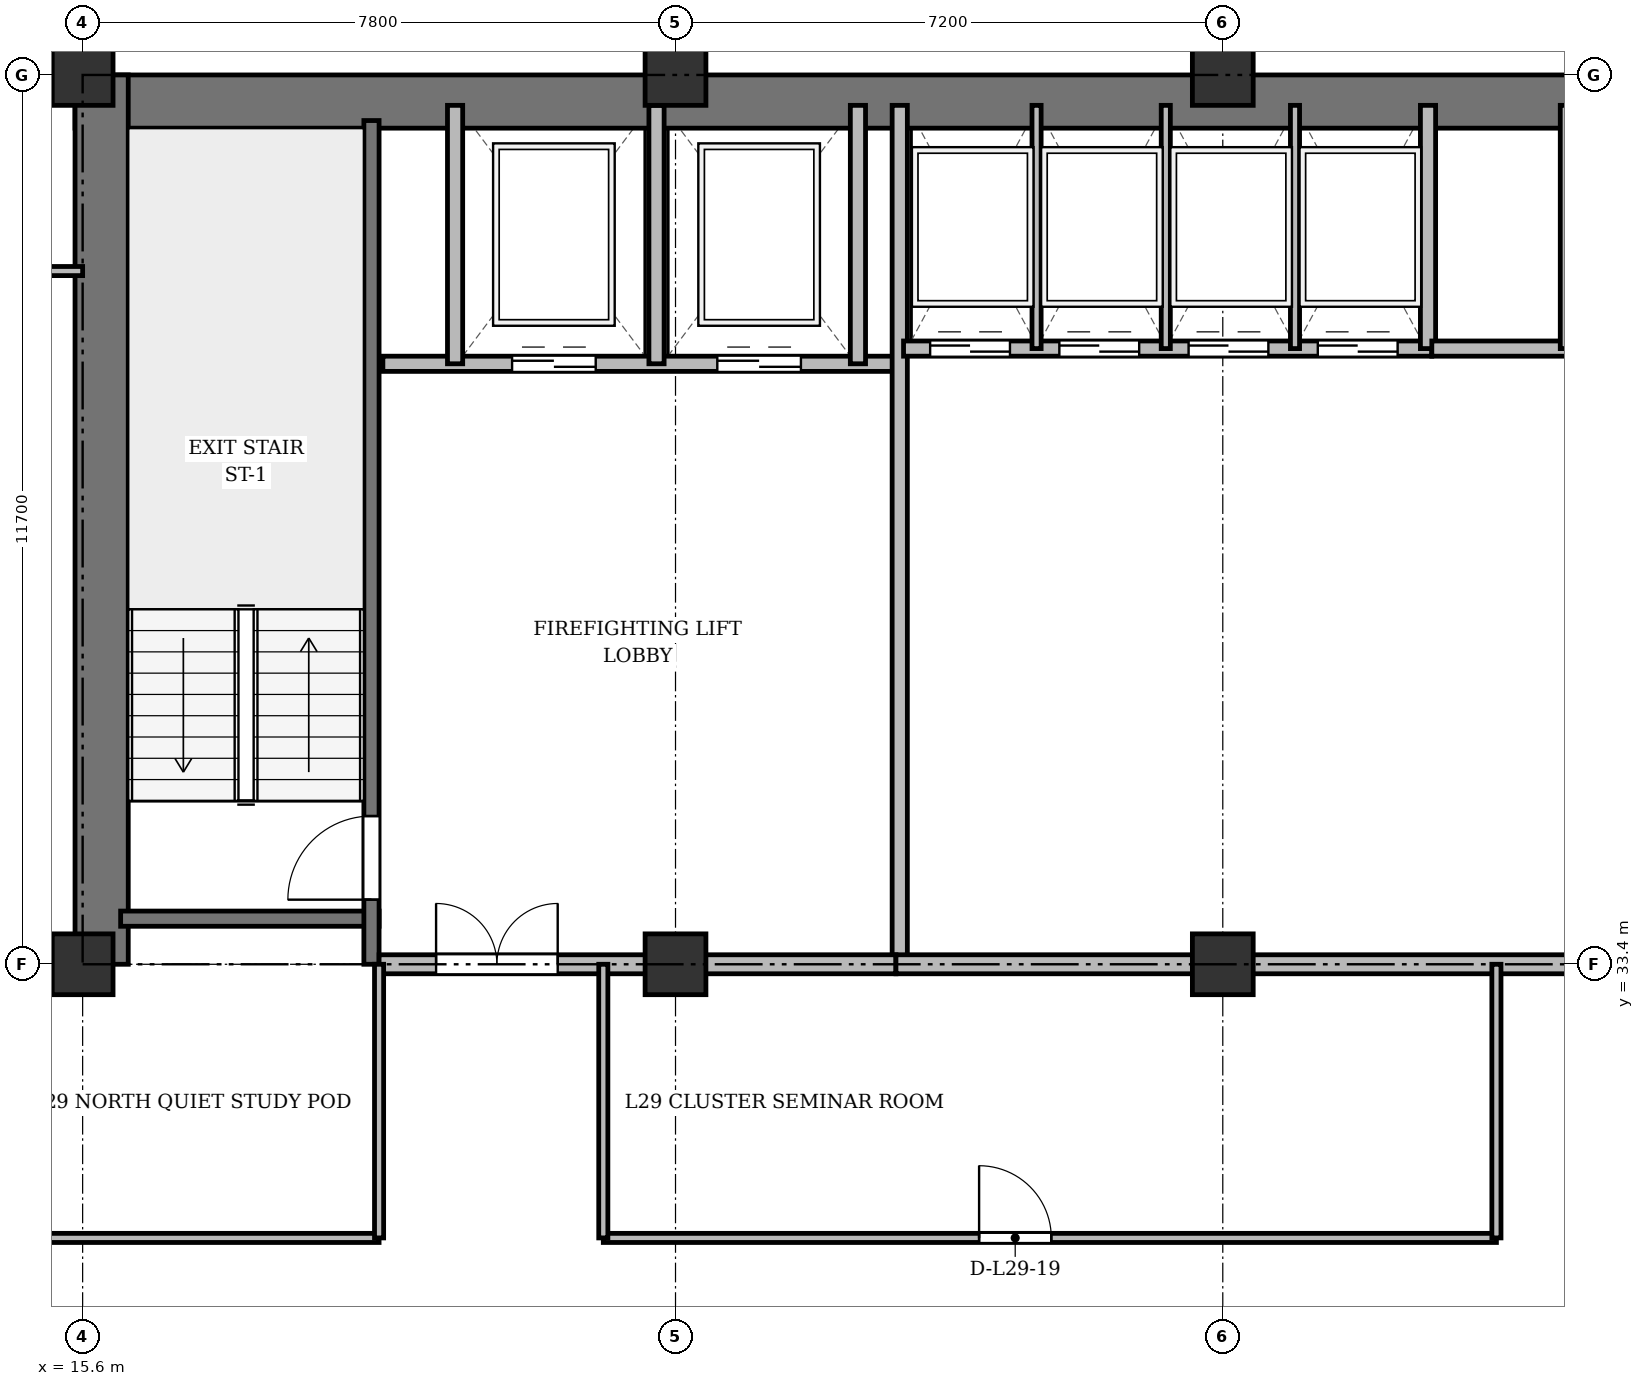
"""IFC4 building model, lengths in metres.
Left out: names, types, materials, properties, quantities, classifications, styles, units other than length and angle.
Written with IfcOpenShell. Run it as: python <this file> out.ifc"""

import sys

from ifc_helpers import new_model, si_unit, direction, frame, frame_2d, origin, origin_2d, place, context, subcontext, project, spatial, rectangle, extrude, source, transform, mapped, element, fill, save


model = new_model("IFC4")
c1 = context("Model", 3, precision=1e-05, world=origin(), true_north=direction((0.0, 1.0)))
c2 = subcontext(c1, "Body", "Model", "MODEL_VIEW")
j1 = project(units=[si_unit("LENGTHUNIT", "METRE"), si_unit("PLANEANGLEUNIT", "RADIAN")], contexts=[c1])
p1 = place(None, origin())
s1 = spatial("IfcSite", under=j1, at=p1, CompositionType="ELEMENT")
p2 = place(p1, origin())
s2 = spatial("IfcBuilding", under=s1, at=p2, CompositionType="ELEMENT")
p3 = place(p2, frame((0.0, 0.0, 114.1)))
s3 = spatial("IfcBuildingStorey", under=s2, at=p3, CompositionType="ELEMENT", Elevation=114.1)
m1 = source(origin(), c2, "Body", "SweptSolid", [
    extrude(rectangle(XDim=0.8, YDim=0.8, at=origin_2d()), origin(), (0.0, 0.0, 1.0), 3.6),
])
for number, where, z_axis, x_axis in (
    (1, (15.6, 33.4, 0.0), (0.0, 0.0, 1.0), (1.0, 0.0, 0.0)),
    (2, (15.6, 45.1, 0.0), (0.0, 0.0, 1.0), (1.0, 0.0, 0.0)),
    (3, (23.4, 33.4, 0.0), (0.0, 0.0, 1.0), (1.0, 0.0, 0.0)),
    (4, (23.4, 45.1, 0.0), (0.0, 0.0, 1.0), (1.0, 0.0, 0.0)),
    (5, (30.6, 33.4, 0.0), (0.0, 0.0, 1.0), (1.0, 0.0, 0.0)),
    (6, (30.6, 45.1, 0.0), (0.0, 0.0, 1.0), (1.0, 0.0, 0.0)),
):
    element("IfcColumn", number, at=place(p3, frame(where, z_axis=z_axis, x_axis=x_axis)), inside=s3, PredefinedType="COLUMN", context=c2, shape_type="MappedRepresentation", body=[
        mapped(m1, transform((0.0, 0.0, 0.0), x_axis=(1.0, 0.0, 0.0), y_axis=(0.0, 1.0, 0.0), z_axis=(0.0, 0.0, 1.0), scale=1.0)),
    ])
p4 = place(p3, frame((15.5, 44.75, 0.0), z_axis=(0.0, 0.0, 1.0), x_axis=(1.0, 0.0, 0.0)))
e7 = element("IfcWall", 7, at=p4, inside=s3, PredefinedType="SHEAR", context=c2, shape_type="SweptSolid", body=[
    extrude(rectangle(XDim=43.4, YDim=0.7, at=frame_2d((21.7, 0.0))), origin(), (0.0, 0.0, 1.0), 3.34),
])
p5 = place(p3, frame((15.85, 33.4, 0.0), z_axis=(0.0, 0.0, 1.0), x_axis=(0.0, 1.0, 0.0)))
e8 = element("IfcWall", 8, at=p5, inside=s3, PredefinedType="SHEAR", context=c2, shape_type="SweptSolid", body=[
    extrude(rectangle(XDim=11.7, YDim=0.7, at=frame_2d((5.85, 0.0))), origin(), (0.0, 0.0, 1.0), 3.34),
])
p6 = place(p3, frame((16.1, 34.0, 0.0), z_axis=(0.0, 0.0, 1.0), x_axis=(1.0, 0.0, 0.0)))
e9 = element("IfcWall", 9, at=p6, inside=s3, PredefinedType="SHEAR", context=c2, shape_type="SweptSolid", body=[
    extrude(rectangle(XDim=3.4, YDim=0.2, at=frame_2d((1.7, 0.0))), origin(), (0.0, 0.0, 1.0), 3.34),
])
p7 = place(p3, frame((19.4, 33.4, 0.0), z_axis=(0.0, 0.0, 1.0), x_axis=(0.0, 1.0, 0.0)))
e10 = element("IfcWall", 10, at=p7, inside=s3, PredefinedType="SHEAR", context=c2, shape_type="SweptSolid", body=[
    extrude(rectangle(XDim=11.1, YDim=0.2, at=frame_2d((5.55, 0.0))), origin(), (0.0, 0.0, 1.0), 3.34),
])
p8 = place(p7, frame((0.85, 0.0, 0.0)))
e11 = element("IfcOpeningElement", 11, at=p8, cuts=e10, PredefinedType="OPENING", context=c2, shape_type="SweptSolid", body=[
    extrude(rectangle(XDim=1.1, YDim=2.15, at=frame_2d((0.55, 1.075))), frame((0.0, 0.11, 0.0), z_axis=(0.0, -1.0, 0.0), x_axis=(1.0, 0.0, 0.0)), (0.0, 0.0, 1.0), 0.22),
])
p9 = place(p3, frame((19.55, 41.3, 0.0), z_axis=(0.0, 0.0, 1.0), x_axis=(1.0, 0.0, 0.0)))
e12 = element("IfcWall", 12, at=p9, inside=s3, PredefinedType="SOLIDWALL", context=c2, shape_type="SweptSolid", body=[
    extrude(rectangle(XDim=6.75, YDim=0.2, at=frame_2d((3.375, 0.0))), origin(), (0.0, 0.0, 1.0), 3.34),
])
p10 = place(p9, frame((1.7, 0.0, 0.0)))
e13 = element("IfcOpeningElement", 13, at=p10, cuts=e12, PredefinedType="OPENING", context=c2, shape_type="SweptSolid", body=[
    extrude(rectangle(XDim=1.1, YDim=2.15, at=frame_2d((0.55, 1.075))), frame((0.0, 0.11, 0.0), z_axis=(0.0, -1.0, 0.0), x_axis=(1.0, 0.0, 0.0)), (0.0, 0.0, 1.0), 0.22),
])
p11 = place(p9, frame((4.4, 0.0, 0.0)))
e14 = element("IfcOpeningElement", 14, at=p11, cuts=e12, PredefinedType="OPENING", context=c2, shape_type="SweptSolid", body=[
    extrude(rectangle(XDim=1.1, YDim=2.15, at=frame_2d((0.55, 1.075))), frame((0.0, 0.11, 0.0), z_axis=(0.0, -1.0, 0.0), x_axis=(1.0, 0.0, 0.0)), (0.0, 0.0, 1.0), 0.22),
])
for number, where, z_axis, x_axis in (
    (15, (20.5, 41.3, 0.0), (0.0, 0.0, 1.0), (0.0, 1.0, 0.0)),
    (16, (23.15, 41.3, 0.0), (0.0, 0.0, 1.0), (0.0, 1.0, 0.0)),
    (17, (25.8, 41.3, 0.0), (0.0, 0.0, 1.0), (0.0, 1.0, 0.0)),
):
    element("IfcWall", number, at=place(p3, frame(where, z_axis=z_axis, x_axis=x_axis)), inside=s3, PredefinedType="SOLIDWALL", context=c2, shape_type="SweptSolid", body=[
        extrude(rectangle(XDim=3.4, YDim=0.2, at=frame_2d((1.7, 0.0))), origin(), (0.0, 0.0, 1.0), 3.34),
    ])
p12 = place(p3, frame((26.35, 33.4, 0.0), z_axis=(0.0, 0.0, 1.0), x_axis=(0.0, 1.0, 0.0)))
e18 = element("IfcWall", 18, at=p12, inside=s3, PredefinedType="SOLIDWALL", context=c2, shape_type="SweptSolid", body=[
    extrude(rectangle(XDim=11.3, YDim=0.2, at=frame_2d((5.65, 0.0))), origin(), (0.0, 0.0, 1.0), 2.752),
])
p13 = place(p3, frame((19.5, 33.4, 0.0), z_axis=(0.0, 0.0, 1.0), x_axis=(1.0, 0.0, 0.0)))
e19 = element("IfcWall", 19, at=p13, inside=s3, PredefinedType="PARTITIONING", context=c2, shape_type="SweptSolid", body=[
    extrude(rectangle(XDim=6.8, YDim=0.25, at=frame_2d((3.4, 0.0))), origin(), (0.0, 0.0, 1.0), 2.752),
])
p14 = place(p13, frame((0.75, 0.0, 0.0)))
e20 = element("IfcOpeningElement", 20, at=p14, cuts=e19, PredefinedType="OPENING", context=c2, shape_type="SweptSolid", body=[
    extrude(rectangle(XDim=1.6, YDim=2.2, at=frame_2d((0.8, 1.1))), frame((0.0, 0.135, 0.0), z_axis=(0.0, -1.0, 0.0), x_axis=(1.0, 0.0, 0.0)), (0.0, 0.0, 1.0), 0.27),
])
p15 = place(p3, frame((26.4, 41.5, 0.0), z_axis=(0.0, 0.0, 1.0), x_axis=(1.0, 0.0, 0.0)))
e21 = element("IfcWall", 21, at=p15, inside=s3, PredefinedType="SOLIDWALL", context=c2, shape_type="SweptSolid", body=[
    extrude(rectangle(XDim=6.95, YDim=0.2, at=frame_2d((3.475, 0.0))), origin(), (0.0, 0.0, 1.0), 3.34),
])
p16 = place(p15, frame((0.35, 0.0, 0.0)))
e22 = element("IfcOpeningElement", 22, at=p16, cuts=e21, PredefinedType="OPENING", context=c2, shape_type="SweptSolid", body=[
    extrude(rectangle(XDim=1.05, YDim=2.15, at=frame_2d((0.525, 1.075))), frame((0.0, 0.11, 0.0), z_axis=(0.0, -1.0, 0.0), x_axis=(1.0, 0.0, 0.0)), (0.0, 0.0, 1.0), 0.22),
])
p17 = place(p15, frame((2.05, 0.0, 0.0)))
e23 = element("IfcOpeningElement", 23, at=p17, cuts=e21, PredefinedType="OPENING", context=c2, shape_type="SweptSolid", body=[
    extrude(rectangle(XDim=1.05, YDim=2.15, at=frame_2d((0.525, 1.075))), frame((0.0, 0.11, 0.0), z_axis=(0.0, -1.0, 0.0), x_axis=(1.0, 0.0, 0.0)), (0.0, 0.0, 1.0), 0.22),
])
p18 = place(p15, frame((3.75, 0.0, 0.0)))
e24 = element("IfcOpeningElement", 24, at=p18, cuts=e21, PredefinedType="OPENING", context=c2, shape_type="SweptSolid", body=[
    extrude(rectangle(XDim=1.05, YDim=2.15, at=frame_2d((0.525, 1.075))), frame((0.0, 0.11, 0.0), z_axis=(0.0, -1.0, 0.0), x_axis=(1.0, 0.0, 0.0)), (0.0, 0.0, 1.0), 0.22),
])
p19 = place(p15, frame((5.45, 0.0, 0.0)))
e25 = element("IfcOpeningElement", 25, at=p19, cuts=e21, PredefinedType="OPENING", context=c2, shape_type="SweptSolid", body=[
    extrude(rectangle(XDim=1.05, YDim=2.15, at=frame_2d((0.525, 1.075))), frame((0.0, 0.11, 0.0), z_axis=(0.0, -1.0, 0.0), x_axis=(1.0, 0.0, 0.0)), (0.0, 0.0, 1.0), 0.22),
])
p20 = place(p3, frame((33.3, 41.5, 0.0), z_axis=(0.0, 0.0, 1.0), x_axis=(0.0, 1.0, 0.0)))
e26 = element("IfcWall", 26, at=p20, inside=s3, PredefinedType="SOLIDWALL", context=c2, shape_type="SweptSolid", body=[
    extrude(rectangle(XDim=3.2, YDim=0.2, at=frame_2d((1.6, 0.0))), origin(), (0.0, 0.0, 1.0), 3.34),
])
for number, where, z_axis, x_axis in (
    (27, (28.15, 41.5, 0.0), (0.0, 0.0, 1.0), (0.0, 1.0, 0.0)),
    (28, (29.85, 41.5, 0.0), (0.0, 0.0, 1.0), (0.0, 1.0, 0.0)),
    (29, (31.55, 41.5, 0.0), (0.0, 0.0, 1.0), (0.0, 1.0, 0.0)),
):
    element("IfcWall", number, at=place(p3, frame(where, z_axis=z_axis, x_axis=x_axis)), inside=s3, PredefinedType="PARTITIONING", context=c2, shape_type="SweptSolid", body=[
        extrude(rectangle(XDim=3.2, YDim=0.12, at=frame_2d((1.6, 0.0))), origin(), (0.0, 0.0, 1.0), 3.34),
    ])
p21 = place(p3, frame((33.35, 41.5, 0.0), z_axis=(0.0, 0.0, 1.0), x_axis=(1.0, 0.0, 0.0)))
e30 = element("IfcWall", 30, at=p21, inside=s3, PredefinedType="SOLIDWALL", context=c2, shape_type="SweptSolid", body=[
    extrude(rectangle(XDim=6.9, YDim=0.2, at=frame_2d((3.45, 0.0))), origin(), (0.0, 0.0, 1.0), 3.34),
])
p22 = place(p3, frame((35.1, 41.5, 0.0), z_axis=(0.0, 0.0, 1.0), x_axis=(0.0, 1.0, 0.0)))
e31 = element("IfcWall", 31, at=p22, inside=s3, PredefinedType="PARTITIONING", context=c2, shape_type="SweptSolid", body=[
    extrude(rectangle(XDim=3.2, YDim=0.12, at=frame_2d((1.6, 0.0))), origin(), (0.0, 0.0, 1.0), 3.34),
])
p23 = place(p3, frame((26.3, 33.4, 0.0), z_axis=(0.0, 0.0, 1.0), x_axis=(1.0, 0.0, 0.0)))
e32 = element("IfcWall", 32, at=p23, inside=s3, PredefinedType="PARTITIONING", context=c2, shape_type="SweptSolid", body=[
    extrude(rectangle(XDim=20.85, YDim=0.25, at=frame_2d((10.425, 0.0))), origin(), (0.0, 0.0, 1.0), 2.752),
])
p24 = place(p23, frame((9.2, 0.0, 0.0)))
e33 = element("IfcOpeningElement", 33, at=p24, cuts=e32, PredefinedType="OPENING", context=c2, shape_type="SweptSolid", body=[
    extrude(rectangle(XDim=1.6, YDim=2.2, at=frame_2d((0.8, 1.1))), frame((0.0, 0.135, 0.0), z_axis=(0.0, -1.0, 0.0), x_axis=(1.0, 0.0, 0.0)), (0.0, 0.0, 1.0), 0.27),
])
p25 = place(p3, frame((4.75, 29.8, 0.0), z_axis=(0.0, 0.0, 1.0), x_axis=(1.0, 0.0, 0.0)))
e34 = element("IfcWall", 34, at=p25, inside=s3, PredefinedType="PARTITIONING", context=c2, shape_type="SweptSolid", body=[
    extrude(rectangle(XDim=14.75, YDim=0.12, at=frame_2d((7.375, 0.0))), origin(), (0.0, 0.0, 1.0), 2.84),
])
p26 = place(p25, frame((6.9, 0.0, 0.0)))
e35 = element("IfcOpeningElement", 35, at=p26, cuts=e34, PredefinedType="OPENING", context=c2, shape_type="SweptSolid", body=[
    extrude(rectangle(XDim=0.95, YDim=2.15, at=frame_2d((0.475, 1.075))), frame((0.0, 0.07, 0.0), z_axis=(0.0, -1.0, 0.0), x_axis=(1.0, 0.0, 0.0)), (0.0, 0.0, 1.0), 0.14),
])
p27 = place(p3, frame((22.45, 29.8, 0.0), z_axis=(0.0, 0.0, 1.0), x_axis=(1.0, 0.0, 0.0)))
e36 = element("IfcWall", 36, at=p27, inside=s3, PredefinedType="PARTITIONING", context=c2, shape_type="SweptSolid", body=[
    extrude(rectangle(XDim=11.75, YDim=0.12, at=frame_2d((5.875, 0.0))), origin(), (0.0, 0.0, 1.0), 2.84),
])
p28 = place(p27, frame((4.944, 0.0, 0.0)))
e37 = element("IfcOpeningElement", 37, at=p28, cuts=e36, PredefinedType="OPENING", context=c2, shape_type="SweptSolid", body=[
    extrude(rectangle(XDim=0.95, YDim=2.15, at=frame_2d((0.475, 1.075))), frame((0.0, 0.07, 0.0), z_axis=(0.0, -1.0, 0.0), x_axis=(1.0, 0.0, 0.0)), (0.0, 0.0, 1.0), 0.14),
])
for number, where, z_axis, x_axis in (
    (38, (19.5, 29.8, 0.0), (0.0, 0.0, 1.0), (0.0, 1.0, 0.0)),
    (39, (22.45, 29.8, 0.0), (0.0, 0.0, 1.0), (0.0, 1.0, 0.0)),
    (40, (34.2, 29.8, 0.0), (0.0, 0.0, 1.0), (0.0, 1.0, 0.0)),
):
    element("IfcWall", number, at=place(p3, frame(where, z_axis=z_axis, x_axis=x_axis)), inside=s3, PredefinedType="PARTITIONING", context=c2, shape_type="SweptSolid", body=[
        extrude(rectangle(XDim=3.6, YDim=0.12, at=frame_2d((1.8, 0.0))), origin(), (0.0, 0.0, 1.0), 2.752),
    ])
p29 = place(p3, frame((10.175, 42.52, 0.0), z_axis=(0.0, 0.0, 1.0), x_axis=(1.0, 0.0, 0.0)))
e41 = element("IfcWall", 41, at=p29, inside=s3, PredefinedType="PARTITIONING", context=c2, shape_type="SweptSolid", body=[
    extrude(rectangle(XDim=5.425, YDim=0.12, at=frame_2d((2.712, 0.0))), origin(), (0.0, 0.0, 1.0), 2.84),
])
p30 = place(p29, frame((2.052, 0.0, 0.0)))
e42 = element("IfcOpeningElement", 42, at=p30, cuts=e41, PredefinedType="OPENING", context=c2, shape_type="SweptSolid", body=[
    extrude(rectangle(XDim=0.95, YDim=2.15, at=frame_2d((0.475, 1.075))), frame((0.0, 0.07, 0.0), z_axis=(0.0, -1.0, 0.0), x_axis=(1.0, 0.0, 0.0)), (0.0, 0.0, 1.0), 0.14),
])
p31 = place(p3, frame((4.75, 33.4, 0.0), z_axis=(0.0, 0.0, 1.0), x_axis=(1.0, 0.0, 0.0)))
e43 = element("IfcWall", 43, at=p31, inside=s3, PredefinedType="PARTITIONING", context=c2, shape_type="SweptSolid", body=[
    extrude(rectangle(XDim=10.85, YDim=0.15, at=frame_2d((5.425, 0.0))), origin(), (0.0, 0.0, 1.0), 2.752),
])
p32 = place(p31, frame((6.025, 0.0, 0.0)))
e44 = element("IfcOpeningElement", 44, at=p32, cuts=e43, PredefinedType="OPENING", context=c2, shape_type="SweptSolid", body=[
    extrude(rectangle(XDim=0.95, YDim=2.15, at=frame_2d((0.475, 1.075))), frame((0.0, 0.085, 0.0), z_axis=(0.0, -1.0, 0.0), x_axis=(1.0, 0.0, 0.0)), (0.0, 0.0, 1.0), 0.17),
])
p33 = place(p3, frame((15.6, 44.75, 0.0), z_axis=(0.0, 0.0, 1.0), x_axis=(0.0, 1.0, 0.0)))
e45 = element("IfcWall", 45, at=p33, inside=s3, PredefinedType="PARTITIONING", context=c2, shape_type="SweptSolid", body=[
    extrude(rectangle(XDim=3.61, YDim=0.15, at=frame_2d((1.805, 0.0))), origin(), (0.0, 0.0, 1.0), 2.84),
])
p34 = place(p33, frame((1.1, 0.0, 0.0)))
e46 = element("IfcOpeningElement", 46, at=p34, cuts=e45, PredefinedType="OPENING", context=c2, shape_type="SweptSolid", body=[
    extrude(rectangle(XDim=0.95, YDim=2.15, at=frame_2d((0.475, 1.075))), frame((0.0, 0.085, 0.0), z_axis=(0.0, -1.0, 0.0), x_axis=(1.0, 0.0, 0.0)), (0.0, 0.0, 1.0), 0.17),
])
m2 = source(origin(), c2, "Body", "SweptSolid", [
    extrude(rectangle(XDim=1.1, YDim=2.15, at=frame_2d((0.55, 1.075))), frame((0.0, 0.025, 0.0), z_axis=(0.0, -1.0, 0.0), x_axis=(1.0, 0.0, 0.0)), (0.0, 0.0, 1.0), 0.05),
])
p35 = place(p8, origin())
e47 = element("IfcDoor", 47, at=p35, inside=s3, OperationType="SINGLE_SWING_LEFT", PredefinedType="DOOR", context=c2, shape_type="MappedRepresentation", body=[
    mapped(m2, transform((0.0, 0.0, 0.0), x_axis=(1.0, 0.0, 0.0), y_axis=(0.0, 1.0, 0.0), z_axis=(0.0, 0.0, 1.0), scale=1.0)),
])
fill(e11, e47)
p36 = place(p10, origin())
e48 = element("IfcDoor", 48, at=p36, inside=s3, OperationType="DOUBLE_DOOR_SLIDING", PredefinedType="DOOR", context=c2, shape_type="MappedRepresentation", body=[
    mapped(m2, transform((0.0, 0.0, 0.0), x_axis=(1.0, 0.0, 0.0), y_axis=(0.0, 1.0, 0.0), z_axis=(0.0, 0.0, 1.0), scale=1.0)),
])
fill(e13, e48)
p37 = place(p11, origin())
e49 = element("IfcDoor", 49, at=p37, inside=s3, OperationType="DOUBLE_DOOR_SLIDING", PredefinedType="DOOR", context=c2, shape_type="MappedRepresentation", body=[
    mapped(m2, transform((0.0, 0.0, 0.0), x_axis=(1.0, 0.0, 0.0), y_axis=(0.0, 1.0, 0.0), z_axis=(0.0, 0.0, 1.0), scale=1.0)),
])
fill(e14, e49)
m3 = source(origin(), c2, "Body", "SweptSolid", [
    extrude(rectangle(XDim=1.6, YDim=2.2, at=frame_2d((0.8, 1.1))), frame((0.0, 0.025, 0.0), z_axis=(0.0, -1.0, 0.0), x_axis=(1.0, 0.0, 0.0)), (0.0, 0.0, 1.0), 0.05),
])
p38 = place(p14, origin())
e50 = element("IfcDoor", 50, at=p38, inside=s3, OperationType="DOUBLE_DOOR_SINGLE_SWING", PredefinedType="DOOR", context=c2, shape_type="MappedRepresentation", body=[
    mapped(m3, transform((0.0, 0.0, 0.0), x_axis=(1.0, 0.0, 0.0), y_axis=(0.0, 1.0, 0.0), z_axis=(0.0, 0.0, 1.0), scale=1.0)),
])
fill(e20, e50)
m4 = source(origin(), c2, "Body", "SweptSolid", [
    extrude(rectangle(XDim=1.05, YDim=2.15, at=frame_2d((0.525, 1.075))), frame((0.0, 0.025, 0.0), z_axis=(0.0, -1.0, 0.0), x_axis=(1.0, 0.0, 0.0)), (0.0, 0.0, 1.0), 0.05),
])
p39 = place(p16, origin())
e51 = element("IfcDoor", 51, at=p39, inside=s3, OperationType="DOUBLE_DOOR_SLIDING", PredefinedType="DOOR", context=c2, shape_type="MappedRepresentation", body=[
    mapped(m4, transform((0.0, 0.0, 0.0), x_axis=(1.0, 0.0, 0.0), y_axis=(0.0, 1.0, 0.0), z_axis=(0.0, 0.0, 1.0), scale=1.0)),
])
fill(e22, e51)
p40 = place(p17, origin())
e52 = element("IfcDoor", 52, at=p40, inside=s3, OperationType="DOUBLE_DOOR_SLIDING", PredefinedType="DOOR", context=c2, shape_type="MappedRepresentation", body=[
    mapped(m4, transform((0.0, 0.0, 0.0), x_axis=(1.0, 0.0, 0.0), y_axis=(0.0, 1.0, 0.0), z_axis=(0.0, 0.0, 1.0), scale=1.0)),
])
fill(e23, e52)
p41 = place(p18, origin())
e53 = element("IfcDoor", 53, at=p41, inside=s3, OperationType="DOUBLE_DOOR_SLIDING", PredefinedType="DOOR", context=c2, shape_type="MappedRepresentation", body=[
    mapped(m4, transform((0.0, 0.0, 0.0), x_axis=(1.0, 0.0, 0.0), y_axis=(0.0, 1.0, 0.0), z_axis=(0.0, 0.0, 1.0), scale=1.0)),
])
fill(e24, e53)
p42 = place(p19, origin())
e54 = element("IfcDoor", 54, at=p42, inside=s3, OperationType="DOUBLE_DOOR_SLIDING", PredefinedType="DOOR", context=c2, shape_type="MappedRepresentation", body=[
    mapped(m4, transform((0.0, 0.0, 0.0), x_axis=(1.0, 0.0, 0.0), y_axis=(0.0, 1.0, 0.0), z_axis=(0.0, 0.0, 1.0), scale=1.0)),
])
fill(e25, e54)
m5 = source(origin(), c2, "Body", "SweptSolid", [
    extrude(rectangle(XDim=0.95, YDim=2.15, at=frame_2d((0.475, 1.075))), frame((0.0, 0.025, 0.0), z_axis=(0.0, -1.0, 0.0), x_axis=(1.0, 0.0, 0.0)), (0.0, 0.0, 1.0), 0.05),
])
p43 = place(p28, origin())
e55 = element("IfcDoor", 55, at=p43, inside=s3, OperationType="SINGLE_SWING_LEFT", PredefinedType="DOOR", context=c2, shape_type="MappedRepresentation", body=[
    mapped(m5, transform((0.0, 0.0, 0.0), x_axis=(1.0, 0.0, 0.0), y_axis=(0.0, 1.0, 0.0), z_axis=(0.0, 0.0, 1.0), scale=1.0)),
])
fill(e37, e55)
save(model, sys.argv[1])
